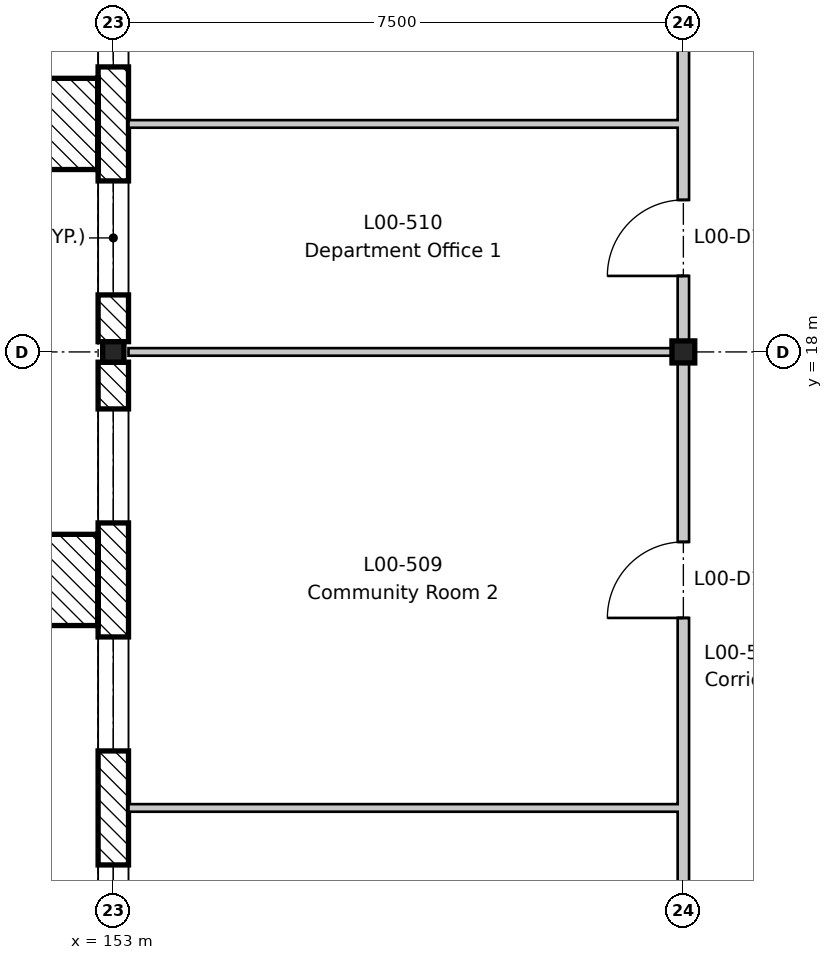
"""IFC4 building model, lengths in metres.
Left out: names, types, materials, properties, quantities, classifications, styles, units other than length and angle.
Written with IfcOpenShell. Run it as: python <this file> out.ifc"""

import sys

from ifc_helpers import new_model, si_unit, direction, frame, frame_2d, origin, origin_2d, place, context, subcontext, project, spatial, rectangle, i_section, extrude, element, fill, save


model = new_model("IFC4")
c1 = context("Model", 3, precision=1e-05, world=origin(), true_north=direction((0.0, 1.0)))
c2 = subcontext(c1, "Body", "Model", "MODEL_VIEW")
j1 = project(units=[si_unit("LENGTHUNIT", "METRE"), si_unit("PLANEANGLEUNIT", "RADIAN")], contexts=[c1])
p1 = place(None, origin())
s1 = spatial("IfcSite", under=j1, at=p1, CompositionType="ELEMENT")
p2 = place(p1, origin())
s2 = spatial("IfcBuilding", under=s1, at=p2, CompositionType="ELEMENT")
p3 = place(p2, origin())
s3 = spatial("IfcBuildingStorey", under=s2, at=p3, CompositionType="ELEMENT", Elevation=0.0)
p4 = place(p3, frame((153.0, 18.0, -0.6), z_axis=(0.0, 0.0, 1.0), x_axis=(1.0, 0.0, 0.0)))
e1 = element("IfcColumn", 1, at=p4, inside=s3, PredefinedType="COLUMN", context=c2, shape_type="SweptSolid", body=[
    extrude(i_section(OverallWidth=0.28, OverallDepth=0.27, WebThickness=0.008, FlangeThickness=0.013, FilletRadius=0.024, at=origin_2d()), origin(), (0.0, 0.0, 1.0), 5.8),
])
p5 = place(p3, frame((160.5, 18.0, -0.6), z_axis=(0.0, 0.0, 1.0), x_axis=(1.0, 0.0, 0.0)))
e2 = element("IfcColumn", 2, at=p5, inside=s3, PredefinedType="COLUMN", context=c2, shape_type="SweptSolid", body=[
    extrude(i_section(OverallWidth=0.3, OverallDepth=0.29, WebThickness=0.009, FlangeThickness=0.014, FilletRadius=0.027, at=origin_2d()), origin(), (0.0, 0.0, 1.0), 5.8),
])
p6 = place(p3, frame((153.0, 9.135, 0.0), z_axis=(0.0, 0.0, 1.0), x_axis=(0.0, 1.0, 0.0)))
e3 = element("IfcWall", 3, at=p6, inside=s3, PredefinedType="STANDARD", context=c2, shape_type="SweptSolid", body=[
    extrude(rectangle(XDim=8.73, YDim=0.4, at=frame_2d((4.365, 0.0))), origin(), (0.0, 0.0, 1.0), 4.8),
])
p7 = place(p6, frame((0.615, 0.0, 0.3)))
e4 = element("IfcOpeningElement", 4, at=p7, cuts=e3, PredefinedType="OPENING", context=c2, shape_type="SweptSolid", body=[
    extrude(rectangle(XDim=1.5, YDim=3.3, at=frame_2d((0.75, 1.65))), frame((0.0, 0.21, 0.0), z_axis=(0.0, -1.0, 0.0), x_axis=(1.0, 0.0, 0.0)), (0.0, 0.0, 1.0), 0.42),
])
p8 = place(p6, frame((3.615, 0.0, 0.3)))
e5 = element("IfcOpeningElement", 5, at=p8, cuts=e3, PredefinedType="OPENING", context=c2, shape_type="SweptSolid", body=[
    extrude(rectangle(XDim=1.5, YDim=3.3, at=frame_2d((0.75, 1.65))), frame((0.0, 0.21, 0.0), z_axis=(0.0, -1.0, 0.0), x_axis=(1.0, 0.0, 0.0)), (0.0, 0.0, 1.0), 0.42),
])
p9 = place(p6, frame((6.615, 0.0, 0.3)))
e6 = element("IfcOpeningElement", 6, at=p9, cuts=e3, PredefinedType="OPENING", context=c2, shape_type="SweptSolid", body=[
    extrude(rectangle(XDim=1.5, YDim=3.3, at=frame_2d((0.75, 1.65))), frame((0.0, 0.21, 0.0), z_axis=(0.0, -1.0, 0.0), x_axis=(1.0, 0.0, 0.0)), (0.0, 0.0, 1.0), 0.42),
])
p10 = place(p3, frame((153.0, 18.135, 0.0), z_axis=(0.0, 0.0, 1.0), x_axis=(0.0, 1.0, 0.0)))
e7 = element("IfcWall", 7, at=p10, inside=s3, PredefinedType="STANDARD", context=c2, shape_type="SweptSolid", body=[
    extrude(rectangle(XDim=8.73, YDim=0.4, at=frame_2d((4.365, 0.0))), origin(), (0.0, 0.0, 1.0), 4.8),
])
p11 = place(p10, frame((0.615, 0.0, 0.3)))
e8 = element("IfcOpeningElement", 8, at=p11, cuts=e7, PredefinedType="OPENING", context=c2, shape_type="SweptSolid", body=[
    extrude(rectangle(XDim=1.5, YDim=3.3, at=frame_2d((0.75, 1.65))), frame((0.0, 0.21, 0.0), z_axis=(0.0, -1.0, 0.0), x_axis=(1.0, 0.0, 0.0)), (0.0, 0.0, 1.0), 0.42),
])
p12 = place(p10, frame((3.615, 0.0, 0.3)))
e9 = element("IfcOpeningElement", 9, at=p12, cuts=e7, PredefinedType="OPENING", context=c2, shape_type="SweptSolid", body=[
    extrude(rectangle(XDim=1.5, YDim=3.3, at=frame_2d((0.75, 1.65))), frame((0.0, 0.21, 0.0), z_axis=(0.0, -1.0, 0.0), x_axis=(1.0, 0.0, 0.0)), (0.0, 0.0, 1.0), 0.42),
])
p13 = place(p10, frame((6.615, 0.0, 0.3)))
e10 = element("IfcOpeningElement", 10, at=p13, cuts=e7, PredefinedType="OPENING", context=c2, shape_type="SweptSolid", body=[
    extrude(rectangle(XDim=1.5, YDim=3.3, at=frame_2d((0.75, 1.65))), frame((0.0, 0.21, 0.0), z_axis=(0.0, -1.0, 0.0), x_axis=(1.0, 0.0, 0.0)), (0.0, 0.0, 1.0), 0.42),
])
for number, where, z_axis, x_axis in (
    (11, (152.2, 14.4, 0.0), (0.0, 0.0, 1.0), (0.0, 1.0, 0.0)),
    (12, (152.2, 20.4, 0.0), (0.0, 0.0, 1.0), (0.0, 1.0, 0.0)),
):
    element("IfcWall", number, at=place(p3, frame(where, z_axis=z_axis, x_axis=x_axis)), inside=s3, PredefinedType="STANDARD", context=c2, shape_type="SweptSolid", body=[
        extrude(rectangle(XDim=1.2, YDim=1.2, at=frame_2d((0.6, 0.0))), origin(), (0.0, 0.0, 1.0), 5.4),
    ])
p14 = place(p3, frame((153.2, 12.0, 0.0), z_axis=(0.0, 0.0, 1.0), x_axis=(1.0, 0.0, 0.0)))
e13 = element("IfcWall", 13, at=p14, inside=s3, PredefinedType="PARTITIONING", context=c2, shape_type="SweptSolid", body=[
    extrude(rectangle(XDim=7.225, YDim=0.1, at=frame_2d((3.613, 0.0))), origin(), (0.0, 0.0, 1.0), 5.2),
])
p15 = place(p3, frame((153.2, 18.0, 0.0), z_axis=(0.0, 0.0, 1.0), x_axis=(1.0, 0.0, 0.0)))
e14 = element("IfcWall", 14, at=p15, inside=s3, PredefinedType="PARTITIONING", context=c2, shape_type="SweptSolid", body=[
    extrude(rectangle(XDim=7.225, YDim=0.1, at=frame_2d((3.613, 0.0))), origin(), (0.0, 0.0, 1.0), 4.85),
])
p16 = place(p3, frame((153.2, 21.0, 0.0), z_axis=(0.0, 0.0, 1.0), x_axis=(1.0, 0.0, 0.0)))
e15 = element("IfcWall", 15, at=p16, inside=s3, PredefinedType="PARTITIONING", context=c2, shape_type="SweptSolid", body=[
    extrude(rectangle(XDim=7.225, YDim=0.1, at=frame_2d((3.613, 0.0))), origin(), (0.0, 0.0, 1.0), 5.2),
])
p17 = place(p3, frame((160.5, 0.0, 0.0), z_axis=(0.0, 0.0, 1.0), x_axis=(0.0, 1.0, 0.0)))
e16 = element("IfcWall", 16, at=p17, inside=s3, PredefinedType="PARTITIONING", context=c2, shape_type="SweptSolid", body=[
    extrude(rectangle(XDim=53.8, YDim=0.15, at=frame_2d((26.9, 0.0))), origin(), (0.0, 0.0, 1.0), 4.68),
])
p18 = place(p17, frame((2.5, 0.0, 0.0)))
e17 = element("IfcOpeningElement", 17, at=p18, cuts=e16, PredefinedType="OPENING", context=c2, shape_type="SweptSolid", body=[
    extrude(rectangle(XDim=1.0, YDim=2.1, at=frame_2d((0.5, 1.05))), frame((0.0, 0.085, 0.0), z_axis=(0.0, -1.0, 0.0), x_axis=(1.0, 0.0, 0.0)), (0.0, 0.0, 1.0), 0.17),
])
p19 = place(p17, frame((9.75, 0.0, 0.0)))
e18 = element("IfcOpeningElement", 18, at=p19, cuts=e16, PredefinedType="OPENING", context=c2, shape_type="SweptSolid", body=[
    extrude(rectangle(XDim=1.0, YDim=2.1, at=frame_2d((0.5, 1.05))), frame((0.0, 0.085, 0.0), z_axis=(0.0, -1.0, 0.0), x_axis=(1.0, 0.0, 0.0)), (0.0, 0.0, 1.0), 0.17),
])
p20 = place(p17, frame((14.5, 0.0, 0.0)))
e19 = element("IfcOpeningElement", 19, at=p20, cuts=e16, PredefinedType="OPENING", context=c2, shape_type="SweptSolid", body=[
    extrude(rectangle(XDim=1.0, YDim=2.1, at=frame_2d((0.5, 1.05))), frame((0.0, 0.085, 0.0), z_axis=(0.0, -1.0, 0.0), x_axis=(1.0, 0.0, 0.0)), (0.0, 0.0, 1.0), 0.17),
])
p21 = place(p17, frame((19.0, 0.0, 0.0)))
e20 = element("IfcOpeningElement", 20, at=p21, cuts=e16, PredefinedType="OPENING", context=c2, shape_type="SweptSolid", body=[
    extrude(rectangle(XDim=1.0, YDim=2.1, at=frame_2d((0.5, 1.05))), frame((0.0, 0.085, 0.0), z_axis=(0.0, -1.0, 0.0), x_axis=(1.0, 0.0, 0.0)), (0.0, 0.0, 1.0), 0.17),
])
p22 = place(p17, frame((24.8, 0.0, 0.0)))
e21 = element("IfcOpeningElement", 21, at=p22, cuts=e16, PredefinedType="OPENING", context=c2, shape_type="SweptSolid", body=[
    extrude(rectangle(XDim=1.4, YDim=2.1, at=frame_2d((0.7, 1.05))), frame((0.0, 0.085, 0.0), z_axis=(0.0, -1.0, 0.0), x_axis=(1.0, 0.0, 0.0)), (0.0, 0.0, 1.0), 0.17),
])
p23 = place(p17, frame((32.5, 0.0, 0.0)))
e22 = element("IfcOpeningElement", 22, at=p23, cuts=e16, PredefinedType="OPENING", context=c2, shape_type="SweptSolid", body=[
    extrude(rectangle(XDim=1.0, YDim=2.1, at=frame_2d((0.5, 1.05))), frame((0.0, 0.085, 0.0), z_axis=(0.0, -1.0, 0.0), x_axis=(1.0, 0.0, 0.0)), (0.0, 0.0, 1.0), 0.17),
])
p24 = place(p17, frame((37.0, 0.0, 0.0)))
e23 = element("IfcOpeningElement", 23, at=p24, cuts=e16, PredefinedType="OPENING", context=c2, shape_type="SweptSolid", body=[
    extrude(rectangle(XDim=1.0, YDim=2.1, at=frame_2d((0.5, 1.05))), frame((0.0, 0.085, 0.0), z_axis=(0.0, -1.0, 0.0), x_axis=(1.0, 0.0, 0.0)), (0.0, 0.0, 1.0), 0.17),
])
p25 = place(p17, frame((40.0, 0.0, 0.0)))
e24 = element("IfcOpeningElement", 24, at=p25, cuts=e16, PredefinedType="OPENING", context=c2, shape_type="SweptSolid", body=[
    extrude(rectangle(XDim=1.0, YDim=2.1, at=frame_2d((0.5, 1.05))), frame((0.0, 0.085, 0.0), z_axis=(0.0, -1.0, 0.0), x_axis=(1.0, 0.0, 0.0)), (0.0, 0.0, 1.0), 0.17),
])
p26 = place(p17, frame((45.75, 0.0, 0.0)))
e25 = element("IfcOpeningElement", 25, at=p26, cuts=e16, PredefinedType="OPENING", context=c2, shape_type="SweptSolid", body=[
    extrude(rectangle(XDim=1.0, YDim=2.1, at=frame_2d((0.5, 1.05))), frame((0.0, 0.085, 0.0), z_axis=(0.0, -1.0, 0.0), x_axis=(1.0, 0.0, 0.0)), (0.0, 0.0, 1.0), 0.17),
])
p27 = place(p17, frame((49.0, 0.0, 0.0)))
e26 = element("IfcOpeningElement", 26, at=p27, cuts=e16, PredefinedType="OPENING", context=c2, shape_type="SweptSolid", body=[
    extrude(rectangle(XDim=1.0, YDim=2.1, at=frame_2d((0.5, 1.05))), frame((0.0, 0.085, 0.0), z_axis=(0.0, -1.0, 0.0), x_axis=(1.0, 0.0, 0.0)), (0.0, 0.0, 1.0), 0.17),
])
p28 = place(p17, frame((52.0, 0.0, 0.0)))
e27 = element("IfcOpeningElement", 27, at=p28, cuts=e16, PredefinedType="OPENING", context=c2, shape_type="SweptSolid", body=[
    extrude(rectangle(XDim=1.0, YDim=2.1, at=frame_2d((0.5, 1.05))), frame((0.0, 0.085, 0.0), z_axis=(0.0, -1.0, 0.0), x_axis=(1.0, 0.0, 0.0)), (0.0, 0.0, 1.0), 0.17),
])
p29 = place(p7, origin())
e28 = element("IfcWindow", 28, at=p29, inside=s3, PartitioningType="SINGLE_PANEL", PredefinedType="WINDOW", context=c2, shape_type="SweptSolid", body=[
    extrude(rectangle(XDim=1.5, YDim=3.3, at=frame_2d((0.75, 1.65))), frame((0.0, -0.12, 0.0), z_axis=(0.0, -1.0, 0.0), x_axis=(1.0, 0.0, 0.0)), (0.0, 0.0, 1.0), 0.06),
])
fill(e4, e28)
p30 = place(p8, origin())
e29 = element("IfcWindow", 29, at=p30, inside=s3, PartitioningType="SINGLE_PANEL", PredefinedType="WINDOW", context=c2, shape_type="SweptSolid", body=[
    extrude(rectangle(XDim=1.5, YDim=3.3, at=frame_2d((0.75, 1.65))), frame((0.0, -0.12, 0.0), z_axis=(0.0, -1.0, 0.0), x_axis=(1.0, 0.0, 0.0)), (0.0, 0.0, 1.0), 0.06),
])
fill(e5, e29)
p31 = place(p9, origin())
e30 = element("IfcWindow", 30, at=p31, inside=s3, PartitioningType="SINGLE_PANEL", PredefinedType="WINDOW", context=c2, shape_type="SweptSolid", body=[
    extrude(rectangle(XDim=1.5, YDim=3.3, at=frame_2d((0.75, 1.65))), frame((0.0, -0.12, 0.0), z_axis=(0.0, -1.0, 0.0), x_axis=(1.0, 0.0, 0.0)), (0.0, 0.0, 1.0), 0.06),
])
fill(e6, e30)
p32 = place(p11, origin())
e31 = element("IfcWindow", 31, at=p32, inside=s3, PartitioningType="SINGLE_PANEL", PredefinedType="WINDOW", context=c2, shape_type="SweptSolid", body=[
    extrude(rectangle(XDim=1.5, YDim=3.3, at=frame_2d((0.75, 1.65))), frame((0.0, -0.12, 0.0), z_axis=(0.0, -1.0, 0.0), x_axis=(1.0, 0.0, 0.0)), (0.0, 0.0, 1.0), 0.06),
])
fill(e8, e31)
p33 = place(p12, origin())
e32 = element("IfcWindow", 32, at=p33, inside=s3, PartitioningType="SINGLE_PANEL", PredefinedType="WINDOW", context=c2, shape_type="SweptSolid", body=[
    extrude(rectangle(XDim=1.5, YDim=3.3, at=frame_2d((0.75, 1.65))), frame((0.0, -0.12, 0.0), z_axis=(0.0, -1.0, 0.0), x_axis=(1.0, 0.0, 0.0)), (0.0, 0.0, 1.0), 0.06),
])
fill(e9, e32)
p34 = place(p20, origin())
e33 = element("IfcDoor", 33, at=p34, inside=s3, OperationType="SINGLE_SWING_LEFT", PredefinedType="DOOR", context=c2, shape_type="SweptSolid", body=[
    extrude(rectangle(XDim=1.0, YDim=2.1, at=frame_2d((0.5, 1.05))), frame((0.0, 0.025, 0.0), z_axis=(0.0, -1.0, 0.0), x_axis=(1.0, 0.0, 0.0)), (0.0, 0.0, 1.0), 0.05),
])
fill(e19, e33)
p35 = place(p21, origin())
e34 = element("IfcDoor", 34, at=p35, inside=s3, OperationType="SINGLE_SWING_LEFT", PredefinedType="DOOR", context=c2, shape_type="SweptSolid", body=[
    extrude(rectangle(XDim=1.0, YDim=2.1, at=frame_2d((0.5, 1.05))), frame((0.0, 0.025, 0.0), z_axis=(0.0, -1.0, 0.0), x_axis=(1.0, 0.0, 0.0)), (0.0, 0.0, 1.0), 0.05),
])
fill(e20, e34)
save(model, sys.argv[1])
